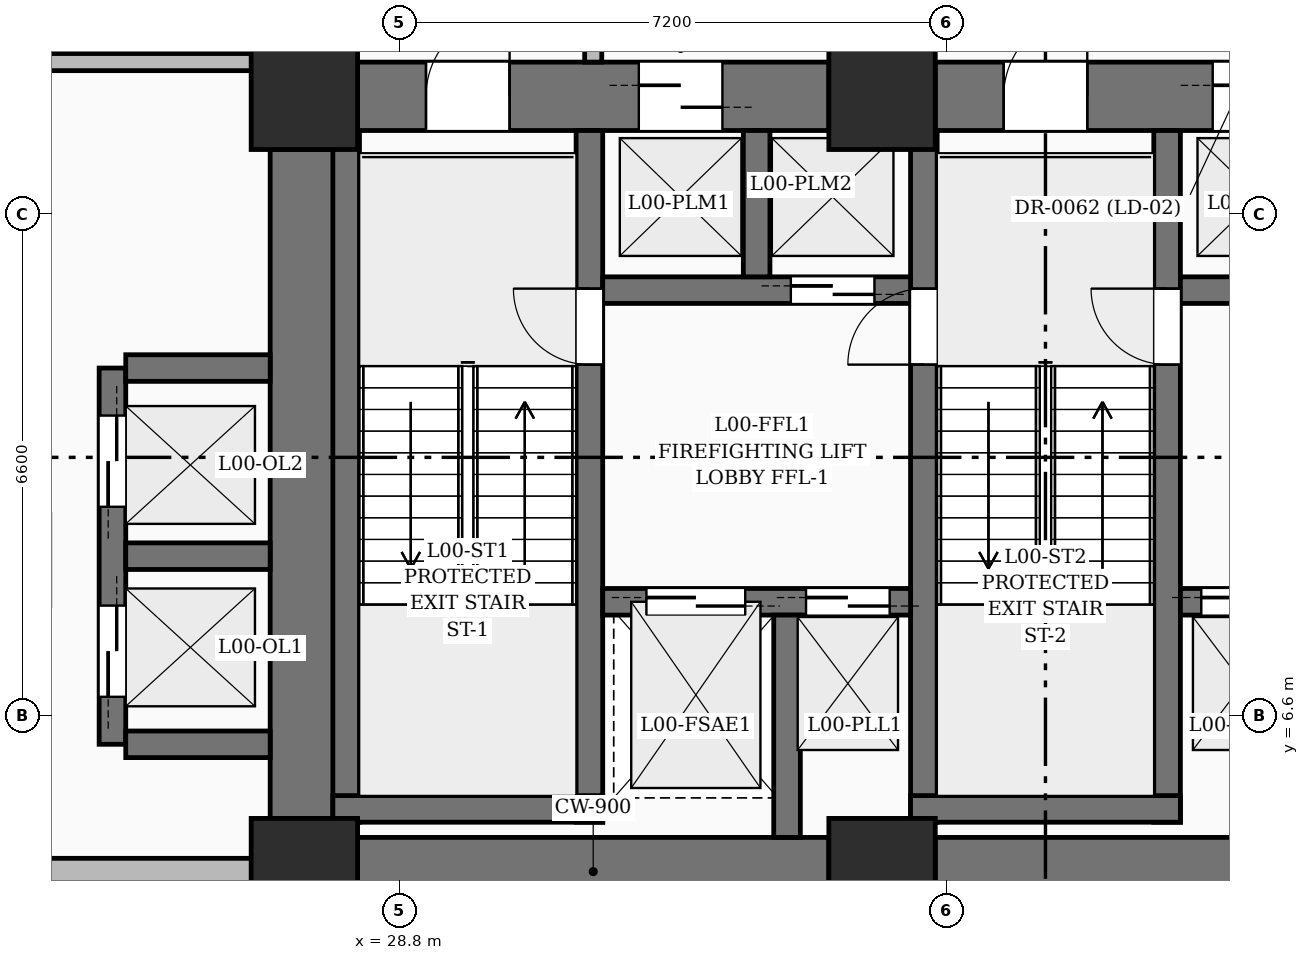
"""IFC4 building model, lengths in metres.
Left out: names, types, materials, properties, quantities, classifications, styles, units other than length and angle.
Written with IfcOpenShell. Run it as: python <this file> out.ifc"""

import sys

from ifc_helpers import new_model, si_unit, direction, frame, frame_2d, origin, origin_2d, place, context, subcontext, project, spatial, rectangle, extrude, element, fill, save


model = new_model("IFC4")
c1 = context("Model", 3, precision=1e-05, world=origin(), true_north=direction((0.0, 1.0)))
c2 = subcontext(c1, "Body", "Model", "MODEL_VIEW")
j1 = project(units=[si_unit("LENGTHUNIT", "METRE"), si_unit("PLANEANGLEUNIT", "RADIAN")], contexts=[c1])
p1 = place(None, origin())
s1 = spatial("IfcSite", under=j1, at=p1, CompositionType="ELEMENT")
p2 = place(p1, origin())
s2 = spatial("IfcBuilding", under=s1, at=p2, CompositionType="ELEMENT")
p3 = place(p2, origin())
s3 = spatial("IfcBuildingStorey", under=s2, at=p3, CompositionType="ELEMENT", Elevation=0.0)
for number, where, z_axis, x_axis in (
    (1, (27.55, 4.55, 0.0), (0.0, 0.0, 1.0), (1.0, 0.0, 0.0)),
    (2, (35.15, 4.55, 0.0), (0.0, 0.0, 1.0), (1.0, 0.0, 0.0)),
    (3, (27.55, 14.75, 0.0), (0.0, 0.0, 1.0), (1.0, 0.0, 0.0)),
    (4, (35.15, 14.75, 0.0), (0.0, 0.0, 1.0), (1.0, 0.0, 0.0)),
):
    element("IfcColumn", number, at=place(p3, frame(where, z_axis=z_axis, x_axis=x_axis)), inside=s3, PredefinedType="COLUMN", context=c2, shape_type="SweptSolid", body=[
        extrude(rectangle(XDim=1.4, YDim=1.4, at=origin_2d()), origin(), (0.0, 0.0, 1.0), 8.4),
    ])
p4 = place(p3, frame((28.25, 4.55, 0.0), z_axis=(0.0, 0.0, 1.0), x_axis=(1.0, 0.0, 0.0)))
e5 = element("IfcWall", 5, at=p4, inside=s3, PredefinedType="SHEAR", context=c2, shape_type="SweptSolid", body=[
    extrude(rectangle(XDim=6.2, YDim=0.9, at=frame_2d((3.1, 0.0))), origin(), (0.0, 0.0, 1.0), 8.4),
])
p5 = place(p3, frame((35.85, 4.55, 0.0), z_axis=(0.0, 0.0, 1.0), x_axis=(1.0, 0.0, 0.0)))
e6 = element("IfcWall", 6, at=p5, inside=s3, PredefinedType="SHEAR", context=c2, shape_type="SweptSolid", body=[
    extrude(rectangle(XDim=10.5, YDim=0.9, at=frame_2d((5.25, 0.0))), origin(), (0.0, 0.0, 1.0), 8.4),
])
p6 = place(p3, frame((28.25, 14.75, 0.0), z_axis=(0.0, 0.0, 1.0), x_axis=(1.0, 0.0, 0.0)))
e7 = element("IfcWall", 7, at=p6, inside=s3, PredefinedType="SHEAR", context=c2, shape_type="SweptSolid", body=[
    extrude(rectangle(XDim=6.2, YDim=0.9, at=frame_2d((3.1, 0.0))), origin(), (0.0, 0.0, 1.0), 8.4),
])
p7 = place(p6, frame((0.9, 0.0, 0.0)))
e8 = element("IfcOpeningElement", 8, at=p7, cuts=e7, PredefinedType="OPENING", context=c2, shape_type="SweptSolid", body=[
    extrude(rectangle(XDim=1.1, YDim=2.2, at=frame_2d((0.55, 1.1))), frame((0.0, 0.46, 0.0), z_axis=(0.0, -1.0, 0.0), x_axis=(1.0, 0.0, 0.0)), (0.0, 0.0, 1.0), 0.92),
])
p8 = place(p6, frame((3.7, 0.0, 0.0)))
e9 = element("IfcOpeningElement", 9, at=p8, cuts=e7, PredefinedType="OPENING", context=c2, shape_type="SweptSolid", body=[
    extrude(rectangle(XDim=1.1, YDim=2.2, at=frame_2d((0.55, 1.1))), frame((0.0, 0.46, 0.0), z_axis=(0.0, -1.0, 0.0), x_axis=(1.0, 0.0, 0.0)), (0.0, 0.0, 1.0), 0.92),
])
p9 = place(p3, frame((35.85, 14.75, 0.0), z_axis=(0.0, 0.0, 1.0), x_axis=(1.0, 0.0, 0.0)))
e10 = element("IfcWall", 10, at=p9, inside=s3, PredefinedType="SHEAR", context=c2, shape_type="SweptSolid", body=[
    extrude(rectangle(XDim=10.5, YDim=0.9, at=frame_2d((5.25, 0.0))), origin(), (0.0, 0.0, 1.0), 8.4),
])
p10 = place(p9, frame((0.9, 0.0, 0.0)))
e11 = element("IfcOpeningElement", 11, at=p10, cuts=e10, PredefinedType="OPENING", context=c2, shape_type="SweptSolid", body=[
    extrude(rectangle(XDim=1.1, YDim=2.2, at=frame_2d((0.55, 1.1))), frame((0.0, 0.46, 0.0), z_axis=(0.0, -1.0, 0.0), x_axis=(1.0, 0.0, 0.0)), (0.0, 0.0, 1.0), 0.92),
])
p11 = place(p9, frame((8.5, 0.0, 0.0)))
e12 = element("IfcOpeningElement", 12, at=p11, cuts=e10, PredefinedType="OPENING", context=c2, shape_type="SweptSolid", body=[
    extrude(rectangle(XDim=1.1, YDim=2.2, at=frame_2d((0.55, 1.1))), frame((0.0, 0.46, 0.0), z_axis=(0.0, -1.0, 0.0), x_axis=(1.0, 0.0, 0.0)), (0.0, 0.0, 1.0), 0.92),
])
p12 = place(p9, frame((3.65, 0.0, 0.0)))
e13 = element("IfcOpeningElement", 13, at=p12, cuts=e10, PredefinedType="OPENING", context=c2, shape_type="SweptSolid", body=[
    extrude(rectangle(XDim=1.2, YDim=2.2, at=frame_2d((0.6, 1.1))), frame((0.0, 0.46, 0.0), z_axis=(0.0, -1.0, 0.0), x_axis=(1.0, 0.0, 0.0)), (0.0, 0.0, 1.0), 0.92),
])
p13 = place(p9, frame((5.65, 0.0, 0.0)))
e14 = element("IfcOpeningElement", 14, at=p13, cuts=e10, PredefinedType="OPENING", context=c2, shape_type="SweptSolid", body=[
    extrude(rectangle(XDim=1.2, YDim=2.2, at=frame_2d((0.6, 1.1))), frame((0.0, 0.46, 0.0), z_axis=(0.0, -1.0, 0.0), x_axis=(1.0, 0.0, 0.0)), (0.0, 0.0, 1.0), 0.92),
])
p14 = place(p3, frame((27.55, 5.25, 0.0), z_axis=(0.0, 0.0, 1.0), x_axis=(0.0, 1.0, 0.0)))
e15 = element("IfcWall", 15, at=p14, inside=s3, PredefinedType="SHEAR", context=c2, shape_type="SweptSolid", body=[
    extrude(rectangle(XDim=8.8, YDim=0.9, at=frame_2d((4.4, 0.0))), origin(), (0.0, 0.0, 1.0), 8.4),
])
p15 = place(p3, frame((28.1, 5.2, 0.0), z_axis=(0.0, 0.0, 1.0), x_axis=(0.0, 1.0, 0.0)))
e16 = element("IfcWall", 16, at=p15, inside=s3, PredefinedType="SOLIDWALL", context=c2, shape_type="SweptSolid", body=[
    extrude(rectangle(XDim=9.1, YDim=0.35, at=frame_2d((4.55, 0.0))), origin(), (0.0, 0.0, 1.0), 8.4),
])
p16 = place(p3, frame((31.3, 5.2, 0.0), z_axis=(0.0, 0.0, 1.0), x_axis=(0.0, 1.0, 0.0)))
e17 = element("IfcWall", 17, at=p16, inside=s3, PredefinedType="SOLIDWALL", context=c2, shape_type="SweptSolid", body=[
    extrude(rectangle(XDim=9.1, YDim=0.35, at=frame_2d((4.55, 0.0))), origin(), (0.0, 0.0, 1.0), 8.4),
])
p17 = place(p16, frame((6.02, 0.0, 0.0)))
e18 = element("IfcOpeningElement", 18, at=p17, cuts=e17, PredefinedType="OPENING", context=c2, shape_type="SweptSolid", body=[
    extrude(rectangle(XDim=1.0, YDim=2.15, at=frame_2d((0.5, 1.075))), frame((0.0, 0.185, 0.0), z_axis=(0.0, -1.0, 0.0), x_axis=(1.0, 0.0, 0.0)), (0.0, 0.0, 1.0), 0.37),
])
p18 = place(p3, frame((27.925, 5.375, 0.0), z_axis=(0.0, 0.0, 1.0), x_axis=(1.0, 0.0, 0.0)))
e19 = element("IfcWall", 19, at=p18, inside=s3, PredefinedType="SOLIDWALL", context=c2, shape_type="SweptSolid", body=[
    extrude(rectangle(XDim=3.55, YDim=0.35, at=frame_2d((1.775, 0.0))), origin(), (0.0, 0.0, 1.0), 8.4),
])
p19 = place(p3, frame((35.7, 5.2, 0.0), z_axis=(0.0, 0.0, 1.0), x_axis=(0.0, 1.0, 0.0)))
e20 = element("IfcWall", 20, at=p19, inside=s3, PredefinedType="SOLIDWALL", context=c2, shape_type="SweptSolid", body=[
    extrude(rectangle(XDim=9.1, YDim=0.35, at=frame_2d((4.55, 0.0))), origin(), (0.0, 0.0, 1.0), 8.4),
])
p20 = place(p19, frame((6.02, 0.0, 0.0)))
e21 = element("IfcOpeningElement", 21, at=p20, cuts=e20, PredefinedType="OPENING", context=c2, shape_type="SweptSolid", body=[
    extrude(rectangle(XDim=1.0, YDim=2.15, at=frame_2d((0.5, 1.075))), frame((0.0, 0.185, 0.0), z_axis=(0.0, -1.0, 0.0), x_axis=(1.0, 0.0, 0.0)), (0.0, 0.0, 1.0), 0.37),
])
p21 = place(p3, frame((38.9, 5.2, 0.0), z_axis=(0.0, 0.0, 1.0), x_axis=(0.0, 1.0, 0.0)))
e22 = element("IfcWall", 22, at=p21, inside=s3, PredefinedType="SOLIDWALL", context=c2, shape_type="SweptSolid", body=[
    extrude(rectangle(XDim=9.1, YDim=0.35, at=frame_2d((4.55, 0.0))), origin(), (0.0, 0.0, 1.0), 8.4),
])
p22 = place(p21, frame((6.02, 0.0, 0.0)))
e23 = element("IfcOpeningElement", 23, at=p22, cuts=e22, PredefinedType="OPENING", context=c2, shape_type="SweptSolid", body=[
    extrude(rectangle(XDim=1.0, YDim=2.15, at=frame_2d((0.5, 1.075))), frame((0.0, 0.185, 0.0), z_axis=(0.0, -1.0, 0.0), x_axis=(1.0, 0.0, 0.0)), (0.0, 0.0, 1.0), 0.37),
])
p23 = place(p3, frame((35.525, 5.375, 0.0), z_axis=(0.0, 0.0, 1.0), x_axis=(1.0, 0.0, 0.0)))
e24 = element("IfcWall", 24, at=p23, inside=s3, PredefinedType="SOLIDWALL", context=c2, shape_type="SweptSolid", body=[
    extrude(rectangle(XDim=3.55, YDim=0.35, at=frame_2d((1.775, 0.0))), origin(), (0.0, 0.0, 1.0), 8.4),
])
p24 = place(p3, frame((31.475, 8.1, 0.0), z_axis=(0.0, 0.0, 1.0), x_axis=(1.0, 0.0, 0.0)))
e25 = element("IfcWall", 25, at=p24, inside=s3, PredefinedType="SOLIDWALL", context=c2, shape_type="SweptSolid", body=[
    extrude(rectangle(XDim=4.05, YDim=0.35, at=frame_2d((2.025, 0.0))), origin(), (0.0, 0.0, 1.0), 8.4),
])
p25 = place(p24, frame((0.575, 0.0, 0.0)))
e26 = element("IfcOpeningElement", 26, at=p25, cuts=e25, PredefinedType="OPENING", context=c2, shape_type="SweptSolid", body=[
    extrude(rectangle(XDim=1.3, YDim=2.25, at=frame_2d((0.65, 1.125))), frame((0.0, 0.185, 0.0), z_axis=(0.0, -1.0, 0.0), x_axis=(1.0, 0.0, 0.0)), (0.0, 0.0, 1.0), 0.37),
])
p26 = place(p24, frame((2.675, 0.0, 0.0)))
e27 = element("IfcOpeningElement", 27, at=p26, cuts=e25, PredefinedType="OPENING", context=c2, shape_type="SweptSolid", body=[
    extrude(rectangle(XDim=1.1, YDim=2.2, at=frame_2d((0.55, 1.1))), frame((0.0, 0.185, 0.0), z_axis=(0.0, -1.0, 0.0), x_axis=(1.0, 0.0, 0.0)), (0.0, 0.0, 1.0), 0.37),
])
p27 = place(p3, frame((39.075, 8.1, 0.0), z_axis=(0.0, 0.0, 1.0), x_axis=(1.0, 0.0, 0.0)))
e28 = element("IfcWall", 28, at=p27, inside=s3, PredefinedType="SOLIDWALL", context=c2, shape_type="SweptSolid", body=[
    extrude(rectangle(XDim=4.05, YDim=0.35, at=frame_2d((2.025, 0.0))), origin(), (0.0, 0.0, 1.0), 8.4),
])
p28 = place(p27, frame((2.175, 0.0, 0.0)))
e29 = element("IfcOpeningElement", 29, at=p28, cuts=e28, PredefinedType="OPENING", context=c2, shape_type="SweptSolid", body=[
    extrude(rectangle(XDim=1.3, YDim=2.25, at=frame_2d((0.65, 1.125))), frame((0.0, 0.185, 0.0), z_axis=(0.0, -1.0, 0.0), x_axis=(1.0, 0.0, 0.0)), (0.0, 0.0, 1.0), 0.37),
])
p29 = place(p27, frame((0.275, 0.0, 0.0)))
e30 = element("IfcOpeningElement", 30, at=p29, cuts=e28, PredefinedType="OPENING", context=c2, shape_type="SweptSolid", body=[
    extrude(rectangle(XDim=1.1, YDim=2.2, at=frame_2d((0.55, 1.1))), frame((0.0, 0.185, 0.0), z_axis=(0.0, -1.0, 0.0), x_axis=(1.0, 0.0, 0.0)), (0.0, 0.0, 1.0), 0.37),
])
p30 = place(p3, frame((33.9, 5.0, 0.0), z_axis=(0.0, 0.0, 1.0), x_axis=(0.0, 1.0, 0.0)))
e31 = element("IfcWall", 31, at=p30, inside=s3, PredefinedType="SOLIDWALL", context=c2, shape_type="SweptSolid", body=[
    extrude(rectangle(XDim=2.925, YDim=0.35, at=frame_2d((1.462, 0.0))), origin(), (0.0, 0.0, 1.0), 8.4),
])
p31 = place(p3, frame((31.475, 12.2, 0.0), z_axis=(0.0, 0.0, 1.0), x_axis=(1.0, 0.0, 0.0)))
e32 = element("IfcWall", 32, at=p31, inside=s3, PredefinedType="SOLIDWALL", context=c2, shape_type="SweptSolid", body=[
    extrude(rectangle(XDim=4.05, YDim=0.35, at=frame_2d((2.025, 0.0))), origin(), (0.0, 0.0, 1.0), 8.4),
])
p32 = place(p31, frame((2.475, 0.0, 0.0)))
e33 = element("IfcOpeningElement", 33, at=p32, cuts=e32, PredefinedType="OPENING", context=c2, shape_type="SweptSolid", body=[
    extrude(rectangle(XDim=1.1, YDim=2.2, at=frame_2d((0.55, 1.1))), frame((0.0, 0.185, 0.0), z_axis=(0.0, -1.0, 0.0), x_axis=(1.0, 0.0, 0.0)), (0.0, 0.0, 1.0), 0.37),
])
p33 = place(p3, frame((33.5, 12.375, 0.0), z_axis=(0.0, 0.0, 1.0), x_axis=(0.0, 1.0, 0.0)))
e34 = element("IfcWall", 34, at=p33, inside=s3, PredefinedType="SOLIDWALL", context=c2, shape_type="SweptSolid", body=[
    extrude(rectangle(XDim=1.925, YDim=0.35, at=frame_2d((0.962, 0.0))), origin(), (0.0, 0.0, 1.0), 8.4),
])
p34 = place(p3, frame((39.075, 12.2, 0.0), z_axis=(0.0, 0.0, 1.0), x_axis=(1.0, 0.0, 0.0)))
e35 = element("IfcWall", 35, at=p34, inside=s3, PredefinedType="SOLIDWALL", context=c2, shape_type="SweptSolid", body=[
    extrude(rectangle(XDim=4.05, YDim=0.35, at=frame_2d((2.025, 0.0))), origin(), (0.0, 0.0, 1.0), 8.4),
])
p35 = place(p3, frame((25.025, 6.225, 0.0), z_axis=(0.0, 0.0, 1.0), x_axis=(0.0, 1.0, 0.0)))
e36 = element("IfcWall", 36, at=p35, inside=s3, PredefinedType="SOLIDWALL", context=c2, shape_type="SweptSolid", body=[
    extrude(rectangle(XDim=4.95, YDim=0.35, at=frame_2d((2.475, 0.0))), origin(), (0.0, 0.0, 1.0), 8.4),
])
p36 = place(p35, frame((0.625, 0.0, 0.0)))
e37 = element("IfcOpeningElement", 37, at=p36, cuts=e36, PredefinedType="OPENING", context=c2, shape_type="SweptSolid", body=[
    extrude(rectangle(XDim=1.2, YDim=2.2, at=frame_2d((0.6, 1.1))), frame((0.0, 0.185, 0.0), z_axis=(0.0, -1.0, 0.0), x_axis=(1.0, 0.0, 0.0)), (0.0, 0.0, 1.0), 0.37),
])
p37 = place(p35, frame((3.125, 0.0, 0.0)))
e38 = element("IfcOpeningElement", 38, at=p37, cuts=e36, PredefinedType="OPENING", context=c2, shape_type="SweptSolid", body=[
    extrude(rectangle(XDim=1.2, YDim=2.2, at=frame_2d((0.6, 1.1))), frame((0.0, 0.185, 0.0), z_axis=(0.0, -1.0, 0.0), x_axis=(1.0, 0.0, 0.0)), (0.0, 0.0, 1.0), 0.37),
])
for number, where, z_axis, x_axis in (
    (39, (25.2, 6.225, 0.0), (0.0, 0.0, 1.0), (1.0, 0.0, 0.0)),
    (40, (25.2, 8.7, 0.0), (0.0, 0.0, 1.0), (1.0, 0.0, 0.0)),
    (41, (25.2, 11.175, 0.0), (0.0, 0.0, 1.0), (1.0, 0.0, 0.0)),
):
    element("IfcWall", number, at=place(p3, frame(where, z_axis=z_axis, x_axis=x_axis)), inside=s3, PredefinedType="SOLIDWALL", context=c2, shape_type="SweptSolid", body=[
        extrude(rectangle(XDim=1.9, YDim=0.35, at=frame_2d((0.95, 0.0))), origin(), (0.0, 0.0, 1.0), 8.4),
    ])
p38 = place(p3, frame((26.888, 4.55, 0.0), z_axis=(0.0, 0.0, 1.0), x_axis=(-1.0, 0.0, 0.0)))
e42 = element("IfcWall", 42, at=p38, inside=s3, PredefinedType="SOLIDWALL", context=c2, shape_type="SweptSolid", body=[
    extrude(rectangle(XDim=3.526, YDim=0.35, at=frame_2d((1.763, 0.0))), origin(), (0.0, 0.0, 1.0), 7.064),
])
p39 = place(p3, frame((31.35, 15.2, 0.0), z_axis=(0.0, 0.0, 1.0), x_axis=(0.0, 1.0, 0.0)))
e43 = element("IfcWall", 43, at=p39, inside=s3, PredefinedType="PARTITIONING", context=c2, shape_type="SweptSolid", body=[
    extrude(rectangle(XDim=2.795, YDim=0.225, at=frame_2d((1.397, 0.0))), origin(), (0.0, 0.0, 1.0), 8.1),
])
p40 = place(p39, frame((0.929, 0.0, 0.0)))
e44 = element("IfcOpeningElement", 44, at=p40, cuts=e43, PredefinedType="OPENING", context=c2, shape_type="SweptSolid", body=[
    extrude(rectangle(XDim=0.95, YDim=2.15, at=frame_2d((0.475, 1.075))), frame((0.0, 0.123, 0.0), z_axis=(0.0, -1.0, 0.0), x_axis=(1.0, 0.0, 0.0)), (0.0, 0.0, 1.0), 0.245),
])
p41 = place(p3, frame((18.4, 15.2, 0.0), z_axis=(0.0, 0.0, 1.0), x_axis=(1.0, 0.0, 0.0)))
e45 = element("IfcWall", 45, at=p41, inside=s3, PredefinedType="PARTITIONING", context=c2, shape_type="SweptSolid", body=[
    extrude(rectangle(XDim=8.7, YDim=0.225, at=frame_2d((4.35, 0.0))), origin(), (0.0, 0.0, 1.0), 5.87),
])
p42 = place(p41, frame((3.816, 0.0, 0.0)))
e46 = element("IfcOpeningElement", 46, at=p42, cuts=e45, PredefinedType="OPENING", context=c2, shape_type="SweptSolid", body=[
    extrude(rectangle(XDim=0.95, YDim=2.15, at=frame_2d((0.475, 1.075))), frame((0.0, 0.123, 0.0), z_axis=(0.0, -1.0, 0.0), x_axis=(1.0, 0.0, 0.0)), (0.0, 0.0, 1.0), 0.245),
])
p43 = place(p7, origin())
e47 = element("IfcDoor", 47, at=p43, inside=s3, OperationType="SINGLE_SWING_RIGHT", PredefinedType="DOOR", context=c2, shape_type="SweptSolid", body=[
    extrude(rectangle(XDim=1.1, YDim=2.2, at=frame_2d((0.55, 1.1))), frame((0.0, 0.025, 0.0), z_axis=(0.0, -1.0, 0.0), x_axis=(1.0, 0.0, 0.0)), (0.0, 0.0, 1.0), 0.05),
])
fill(e8, e47)
p44 = place(p10, origin())
e48 = element("IfcDoor", 48, at=p44, inside=s3, OperationType="SINGLE_SWING_RIGHT", PredefinedType="DOOR", context=c2, shape_type="SweptSolid", body=[
    extrude(rectangle(XDim=1.1, YDim=2.2, at=frame_2d((0.55, 1.1))), frame((0.0, 0.025, 0.0), z_axis=(0.0, -1.0, 0.0), x_axis=(1.0, 0.0, 0.0)), (0.0, 0.0, 1.0), 0.05),
])
fill(e11, e48)
p45 = place(p17, origin())
e49 = element("IfcDoor", 49, at=p45, inside=s3, OperationType="SINGLE_SWING_RIGHT", PredefinedType="DOOR", context=c2, shape_type="SweptSolid", body=[
    extrude(rectangle(XDim=1.0, YDim=2.15, at=frame_2d((0.5, 1.075))), frame((0.0, 0.025, 0.0), z_axis=(0.0, -1.0, 0.0), x_axis=(1.0, 0.0, 0.0)), (0.0, 0.0, 1.0), 0.05),
])
fill(e18, e49)
p46 = place(p20, origin())
e50 = element("IfcDoor", 50, at=p46, inside=s3, OperationType="SINGLE_SWING_LEFT", PredefinedType="DOOR", context=c2, shape_type="SweptSolid", body=[
    extrude(rectangle(XDim=1.0, YDim=2.15, at=frame_2d((0.5, 1.075))), frame((0.0, 0.025, 0.0), z_axis=(0.0, -1.0, 0.0), x_axis=(1.0, 0.0, 0.0)), (0.0, 0.0, 1.0), 0.05),
])
fill(e21, e50)
p47 = place(p22, origin())
e51 = element("IfcDoor", 51, at=p47, inside=s3, OperationType="SINGLE_SWING_RIGHT", PredefinedType="DOOR", context=c2, shape_type="SweptSolid", body=[
    extrude(rectangle(XDim=1.0, YDim=2.15, at=frame_2d((0.5, 1.075))), frame((0.0, 0.025, 0.0), z_axis=(0.0, -1.0, 0.0), x_axis=(1.0, 0.0, 0.0)), (0.0, 0.0, 1.0), 0.05),
])
fill(e23, e51)
p48 = place(p25, origin())
e52 = element("IfcDoor", 52, at=p48, inside=s3, OperationType="DOUBLE_DOOR_SLIDING", PredefinedType="DOOR", context=c2, shape_type="SweptSolid", body=[
    extrude(rectangle(XDim=1.3, YDim=2.25, at=frame_2d((0.65, 1.125))), frame((0.0, 0.025, 0.0), z_axis=(0.0, -1.0, 0.0), x_axis=(1.0, 0.0, 0.0)), (0.0, 0.0, 1.0), 0.05),
])
fill(e26, e52)
p49 = place(p26, origin())
e53 = element("IfcDoor", 53, at=p49, inside=s3, OperationType="DOUBLE_DOOR_SLIDING", PredefinedType="DOOR", context=c2, shape_type="SweptSolid", body=[
    extrude(rectangle(XDim=1.1, YDim=2.2, at=frame_2d((0.55, 1.1))), frame((0.0, 0.025, 0.0), z_axis=(0.0, -1.0, 0.0), x_axis=(1.0, 0.0, 0.0)), (0.0, 0.0, 1.0), 0.05),
])
fill(e27, e53)
p50 = place(p29, origin())
e54 = element("IfcDoor", 54, at=p50, inside=s3, OperationType="DOUBLE_DOOR_SLIDING", PredefinedType="DOOR", context=c2, shape_type="SweptSolid", body=[
    extrude(rectangle(XDim=1.1, YDim=2.2, at=frame_2d((0.55, 1.1))), frame((0.0, 0.025, 0.0), z_axis=(0.0, -1.0, 0.0), x_axis=(1.0, 0.0, 0.0)), (0.0, 0.0, 1.0), 0.05),
])
fill(e30, e54)
p51 = place(p8, origin())
e55 = element("IfcDoor", 55, at=p51, inside=s3, OperationType="DOUBLE_DOOR_SLIDING", PredefinedType="DOOR", context=c2, shape_type="SweptSolid", body=[
    extrude(rectangle(XDim=1.1, YDim=2.2, at=frame_2d((0.55, 1.1))), frame((0.0, 0.025, 0.0), z_axis=(0.0, -1.0, 0.0), x_axis=(1.0, 0.0, 0.0)), (0.0, 0.0, 1.0), 0.05),
])
fill(e9, e55)
p52 = place(p32, origin())
e56 = element("IfcDoor", 56, at=p52, inside=s3, OperationType="DOUBLE_DOOR_SLIDING", PredefinedType="DOOR", context=c2, shape_type="SweptSolid", body=[
    extrude(rectangle(XDim=1.1, YDim=2.2, at=frame_2d((0.55, 1.1))), frame((0.0, 0.025, 0.0), z_axis=(0.0, -1.0, 0.0), x_axis=(1.0, 0.0, 0.0)), (0.0, 0.0, 1.0), 0.05),
])
fill(e33, e56)
p53 = place(p12, origin())
e57 = element("IfcDoor", 57, at=p53, inside=s3, OperationType="DOUBLE_DOOR_SLIDING", PredefinedType="DOOR", context=c2, shape_type="SweptSolid", body=[
    extrude(rectangle(XDim=1.2, YDim=2.2, at=frame_2d((0.6, 1.1))), frame((0.0, 0.025, 0.0), z_axis=(0.0, -1.0, 0.0), x_axis=(1.0, 0.0, 0.0)), (0.0, 0.0, 1.0), 0.05),
])
fill(e13, e57)
p54 = place(p36, origin())
e58 = element("IfcDoor", 58, at=p54, inside=s3, OperationType="DOUBLE_DOOR_SLIDING", PredefinedType="DOOR", context=c2, shape_type="SweptSolid", body=[
    extrude(rectangle(XDim=1.2, YDim=2.2, at=frame_2d((0.6, 1.1))), frame((0.0, 0.025, 0.0), z_axis=(0.0, -1.0, 0.0), x_axis=(1.0, 0.0, 0.0)), (0.0, 0.0, 1.0), 0.05),
])
fill(e37, e58)
p55 = place(p37, origin())
e59 = element("IfcDoor", 59, at=p55, inside=s3, OperationType="DOUBLE_DOOR_SLIDING", PredefinedType="DOOR", context=c2, shape_type="SweptSolid", body=[
    extrude(rectangle(XDim=1.2, YDim=2.2, at=frame_2d((0.6, 1.1))), frame((0.0, 0.025, 0.0), z_axis=(0.0, -1.0, 0.0), x_axis=(1.0, 0.0, 0.0)), (0.0, 0.0, 1.0), 0.05),
])
fill(e38, e59)
save(model, sys.argv[1])
